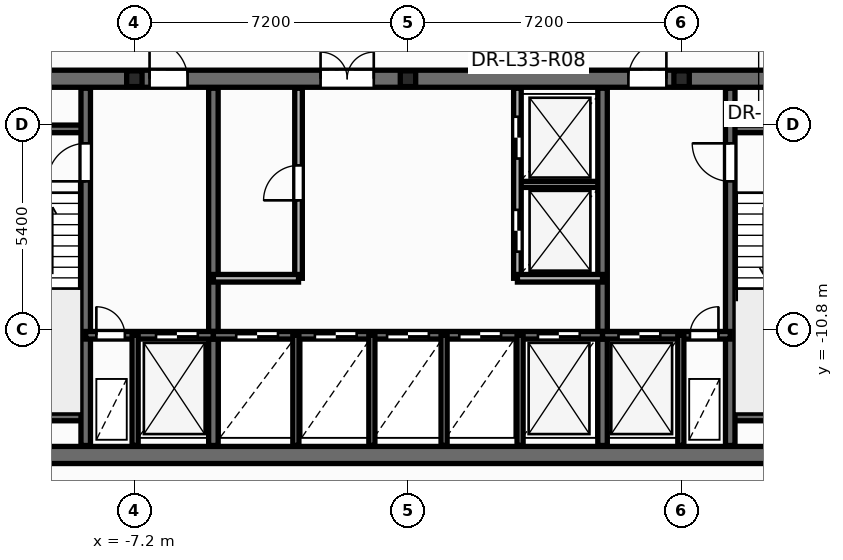
"""IFC4 building model, lengths in metres.
Left out: names, types, materials, properties, quantities, classifications, styles, units other than length and angle.
Written with IfcOpenShell. Run it as: python <this file> out.ifc"""

import sys

from ifc_helpers import new_model, si_unit, direction, frame, frame_2d, origin, origin_2d, place, context, subcontext, project, spatial, rectangle, i_section, extrude, element, fill, save


model = new_model("IFC4")
c1 = context("Model", 3, precision=1e-05, world=origin(), true_north=direction((0.0, 1.0)))
c2 = subcontext(c1, "Body", "Model", "MODEL_VIEW")
j1 = project(units=[si_unit("LENGTHUNIT", "METRE"), si_unit("PLANEANGLEUNIT", "RADIAN")], contexts=[c1])
p1 = place(None, origin())
s1 = spatial("IfcSite", under=j1, at=p1, CompositionType="ELEMENT")
p2 = place(p1, origin())
s2 = spatial("IfcBuilding", under=s1, at=p2, CompositionType="ELEMENT")
p3 = place(p2, frame((0.0, 0.0, 129.3)))
s3 = spatial("IfcBuildingStorey", under=s2, at=p3, CompositionType="ELEMENT", Elevation=129.3)
for number, where, z_axis, x_axis in (
    (1, (-7.2, -4.2, 0.0), (0.0, 0.0, 1.0), (1.0, 0.0, 0.0)),
    (2, (0.0, -4.2, 0.0), (0.0, 0.0, 1.0), (1.0, 0.0, 0.0)),
    (3, (7.2, -4.2, 0.0), (0.0, 0.0, 1.0), (1.0, 0.0, 0.0)),
):
    element("IfcColumn", number, at=place(p3, frame(where, z_axis=z_axis, x_axis=x_axis)), inside=s3, PredefinedType="PILASTER", context=c2, shape_type="SweptSolid", body=[
        extrude(i_section(OverallWidth=0.405, OverallDepth=0.414, WebThickness=0.022, FlangeThickness=0.032, at=origin_2d()), origin(), (0.0, 0.0, 1.0), 3.6),
    ])
p4 = place(p3, frame((2.88, -6.98, 0.0), z_axis=(0.0, 0.0, 1.0), x_axis=(1.0, 0.0, 0.0)))
e4 = element("IfcWall", 4, at=p4, inside=s3, PredefinedType="PARTITIONING", context=c2, shape_type="SweptSolid", body=[
    extrude(rectangle(XDim=2.24, YDim=0.16, at=frame_2d((1.12, 0.0))), origin(), (0.0, 0.0, 1.0), 3.35),
])
p5 = place(p3, frame((-12.65, -14.1, 0.0), z_axis=(0.0, 0.0, 1.0), x_axis=(1.0, 0.0, 0.0)))
e5 = element("IfcWall", 5, at=p5, inside=s3, PredefinedType="SHEAR", context=c2, shape_type="SweptSolid", body=[
    extrude(rectangle(XDim=25.3, YDim=0.45, at=frame_2d((12.65, 0.0))), origin(), (0.0, 0.0, 1.0), 3.6),
])
p6 = place(p3, frame((-12.65, -4.2, 0.0), z_axis=(0.0, 0.0, 1.0), x_axis=(1.0, 0.0, 0.0)))
e6 = element("IfcWall", 6, at=p6, inside=s3, PredefinedType="SHEAR", context=c2, shape_type="SweptSolid", body=[
    extrude(rectangle(XDim=25.3, YDim=0.45, at=frame_2d((12.65, 0.0))), origin(), (0.0, 0.0, 1.0), 3.6),
])
p7 = place(p6, frame((1.85, 0.0, 0.0)))
e7 = element("IfcOpeningElement", 7, at=p7, cuts=e6, PredefinedType="OPENING", context=c2, shape_type="SweptSolid", body=[
    extrude(rectangle(XDim=0.756, YDim=2.054, at=frame_2d((0.375, 1.027))), frame((0.0, 0.235, 0.0), z_axis=(0.0, -1.0, 0.0), x_axis=(1.0, 0.0, 0.0)), (0.0, 0.0, 1.0), 0.47),
])
p8 = place(p6, frame((22.65, 0.0, 0.0)))
e8 = element("IfcOpeningElement", 8, at=p8, cuts=e6, PredefinedType="OPENING", context=c2, shape_type="SweptSolid", body=[
    extrude(rectangle(XDim=0.756, YDim=2.054, at=frame_2d((0.375, 1.027))), frame((0.0, 0.235, 0.0), z_axis=(0.0, -1.0, 0.0), x_axis=(1.0, 0.0, 0.0)), (0.0, 0.0, 1.0), 0.47),
])
p9 = place(p6, frame((5.85, 0.0, 0.0)))
e9 = element("IfcOpeningElement", 9, at=p9, cuts=e6, PredefinedType="OPENING", context=c2, shape_type="SweptSolid", body=[
    extrude(rectangle(XDim=1.006, YDim=2.104, at=frame_2d((0.5, 1.052))), frame((0.0, 0.235, 0.0), z_axis=(0.0, -1.0, 0.0), x_axis=(1.0, 0.0, 0.0)), (0.0, 0.0, 1.0), 0.47),
])
p10 = place(p6, frame((10.35, 0.0, 0.0)))
e10 = element("IfcOpeningElement", 10, at=p10, cuts=e6, PredefinedType="OPENING", context=c2, shape_type="SweptSolid", body=[
    extrude(rectangle(XDim=1.406, YDim=2.154, at=frame_2d((0.7, 1.077))), frame((0.0, 0.235, 0.0), z_axis=(0.0, -1.0, 0.0), x_axis=(1.0, 0.0, 0.0)), (0.0, 0.0, 1.0), 0.47),
])
p11 = place(p6, frame((18.45, 0.0, 0.0)))
e11 = element("IfcOpeningElement", 11, at=p11, cuts=e6, PredefinedType="OPENING", context=c2, shape_type="SweptSolid", body=[
    extrude(rectangle(XDim=1.006, YDim=2.104, at=frame_2d((0.5, 1.052))), frame((0.0, 0.235, 0.0), z_axis=(0.0, -1.0, 0.0), x_axis=(1.0, 0.0, 0.0)), (0.0, 0.0, 1.0), 0.47),
])
for number, where, z_axis, x_axis in (
    (12, (-12.35, -5.52, 0.0), (0.0, 0.0, 1.0), (1.0, 0.0, 0.0)),
    (13, (-12.35, -13.1, 0.0), (0.0, 0.0, 1.0), (1.0, 0.0, 0.0)),
    (14, (8.48, -5.52, 0.0), (0.0, 0.0, 1.0), (1.0, 0.0, 0.0)),
    (15, (8.48, -13.1, 0.0), (0.0, 0.0, 1.0), (1.0, 0.0, 0.0)),
):
    element("IfcWall", number, at=place(p3, frame(where, z_axis=z_axis, x_axis=x_axis)), inside=s3, PredefinedType="SOLIDWALL", context=c2, shape_type="SweptSolid", body=[
        extrude(rectangle(XDim=3.87, YDim=0.2, at=frame_2d((1.935, 0.0))), origin(), (0.0, 0.0, 1.0), 3.6),
    ])
p12 = place(p3, frame((-8.48, -13.85, 0.0), z_axis=(0.0, 0.0, 1.0), x_axis=(0.0, 1.0, 0.0)))
e16 = element("IfcWall", 16, at=p12, inside=s3, PredefinedType="SHEAR", context=c2, shape_type="SweptSolid", body=[
    extrude(rectangle(XDim=9.4, YDim=0.25, at=frame_2d((4.7, 0.0))), origin(), (0.0, 0.0, 1.0), 3.6),
])
p13 = place(p12, frame((6.95, 0.0, 0.0)))
e17 = element("IfcOpeningElement", 17, at=p13, cuts=e16, PredefinedType="OPENING", context=c2, shape_type="SweptSolid", body=[
    extrude(rectangle(XDim=1.006, YDim=2.104, at=frame_2d((0.5, 1.052))), frame((0.0, 0.135, 0.0), z_axis=(0.0, -1.0, 0.0), x_axis=(1.0, 0.0, 0.0)), (0.0, 0.0, 1.0), 0.27),
])
p14 = place(p3, frame((8.48, -13.85, 0.0), z_axis=(0.0, 0.0, 1.0), x_axis=(0.0, 1.0, 0.0)))
e18 = element("IfcWall", 18, at=p14, inside=s3, PredefinedType="SHEAR", context=c2, shape_type="SweptSolid", body=[
    extrude(rectangle(XDim=9.4, YDim=0.25, at=frame_2d((4.7, 0.0))), origin(), (0.0, 0.0, 1.0), 3.6),
])
p15 = place(p14, frame((6.95, 0.0, 0.0)))
e19 = element("IfcOpeningElement", 19, at=p15, cuts=e18, PredefinedType="OPENING", context=c2, shape_type="SweptSolid", body=[
    extrude(rectangle(XDim=1.006, YDim=2.104, at=frame_2d((0.5, 1.052))), frame((0.0, 0.135, 0.0), z_axis=(0.0, -1.0, 0.0), x_axis=(1.0, 0.0, 0.0)), (0.0, 0.0, 1.0), 0.27),
])
for number, where, z_axis, x_axis in (
    (20, (-5.12, -13.85, 0.0), (0.0, 0.0, 1.0), (0.0, 1.0, 0.0)),
    (21, (5.12, -13.85, 0.0), (0.0, 0.0, 1.0), (0.0, 1.0, 0.0)),
):
    element("IfcWall", number, at=place(p3, frame(where, z_axis=z_axis, x_axis=x_axis)), inside=s3, PredefinedType="SHEAR", context=c2, shape_type="SweptSolid", body=[
        extrude(rectangle(XDim=9.4, YDim=0.25, at=frame_2d((4.7, 0.0))), origin(), (0.0, 0.0, 1.0), 3.6),
    ])
p16 = place(p3, frame((-8.48, -10.95, 0.0), z_axis=(0.0, 0.0, 1.0), x_axis=(1.0, 0.0, 0.0)))
e22 = element("IfcWall", 22, at=p16, inside=s3, PredefinedType="SOLIDWALL", context=c2, shape_type="SweptSolid", body=[
    extrude(rectangle(XDim=3.36, YDim=0.2, at=frame_2d((1.68, 0.0))), origin(), (0.0, 0.0, 1.0), 3.6),
])
p17 = place(p16, frame((0.28, 0.0, 0.0)))
e23 = element("IfcOpeningElement", 23, at=p17, cuts=e22, PredefinedType="OPENING", context=c2, shape_type="SweptSolid", body=[
    extrude(rectangle(XDim=0.756, YDim=2.054, at=frame_2d((0.375, 1.027))), frame((0.0, 0.11, 0.0), z_axis=(0.0, -1.0, 0.0), x_axis=(1.0, 0.0, 0.0)), (0.0, 0.0, 1.0), 0.22),
])
p18 = place(p16, frame((1.85, 0.0, 0.0)))
e24 = element("IfcOpeningElement", 24, at=p18, cuts=e22, PredefinedType="OPENING", context=c2, shape_type="SweptSolid", body=[
    extrude(rectangle(XDim=1.106, YDim=2.104, at=frame_2d((0.55, 1.052))), frame((0.0, 0.11, 0.0), z_axis=(0.0, -1.0, 0.0), x_axis=(1.0, 0.0, 0.0)), (0.0, 0.0, 1.0), 0.22),
])
p19 = place(p3, frame((-5.12, -10.95, 0.0), z_axis=(0.0, 0.0, 1.0), x_axis=(1.0, 0.0, 0.0)))
e25 = element("IfcWall", 25, at=p19, inside=s3, PredefinedType="SOLIDWALL", context=c2, shape_type="SweptSolid", body=[
    extrude(rectangle(XDim=10.24, YDim=0.2, at=frame_2d((5.12, 0.0))), origin(), (0.0, 0.0, 1.0), 3.6),
])
p20 = place(p19, frame((0.6, 0.0, 0.0)))
e26 = element("IfcOpeningElement", 26, at=p20, cuts=e25, PredefinedType="OPENING", context=c2, shape_type="SweptSolid", body=[
    extrude(rectangle(XDim=1.106, YDim=2.104, at=frame_2d((0.55, 1.052))), frame((0.0, 0.11, 0.0), z_axis=(0.0, -1.0, 0.0), x_axis=(1.0, 0.0, 0.0)), (0.0, 0.0, 1.0), 0.22),
])
p21 = place(p19, frame((2.67, 0.0, 0.0)))
e27 = element("IfcOpeningElement", 27, at=p21, cuts=e25, PredefinedType="OPENING", context=c2, shape_type="SweptSolid", body=[
    extrude(rectangle(XDim=1.106, YDim=2.104, at=frame_2d((0.55, 1.052))), frame((0.0, 0.11, 0.0), z_axis=(0.0, -1.0, 0.0), x_axis=(1.0, 0.0, 0.0)), (0.0, 0.0, 1.0), 0.22),
])
p22 = place(p19, frame((4.57, 0.0, 0.0)))
e28 = element("IfcOpeningElement", 28, at=p22, cuts=e25, PredefinedType="OPENING", context=c2, shape_type="SweptSolid", body=[
    extrude(rectangle(XDim=1.106, YDim=2.104, at=frame_2d((0.55, 1.052))), frame((0.0, 0.11, 0.0), z_axis=(0.0, -1.0, 0.0), x_axis=(1.0, 0.0, 0.0)), (0.0, 0.0, 1.0), 0.22),
])
p23 = place(p19, frame((6.47, 0.0, 0.0)))
e29 = element("IfcOpeningElement", 29, at=p23, cuts=e25, PredefinedType="OPENING", context=c2, shape_type="SweptSolid", body=[
    extrude(rectangle(XDim=1.106, YDim=2.104, at=frame_2d((0.55, 1.052))), frame((0.0, 0.11, 0.0), z_axis=(0.0, -1.0, 0.0), x_axis=(1.0, 0.0, 0.0)), (0.0, 0.0, 1.0), 0.22),
])
p24 = place(p19, frame((8.54, 0.0, 0.0)))
e30 = element("IfcOpeningElement", 30, at=p24, cuts=e25, PredefinedType="OPENING", context=c2, shape_type="SweptSolid", body=[
    extrude(rectangle(XDim=1.106, YDim=2.104, at=frame_2d((0.55, 1.052))), frame((0.0, 0.11, 0.0), z_axis=(0.0, -1.0, 0.0), x_axis=(1.0, 0.0, 0.0)), (0.0, 0.0, 1.0), 0.22),
])
p25 = place(p3, frame((5.12, -10.95, 0.0), z_axis=(0.0, 0.0, 1.0), x_axis=(1.0, 0.0, 0.0)))
e31 = element("IfcWall", 31, at=p25, inside=s3, PredefinedType="SOLIDWALL", context=c2, shape_type="SweptSolid", body=[
    extrude(rectangle(XDim=3.36, YDim=0.2, at=frame_2d((1.68, 0.0))), origin(), (0.0, 0.0, 1.0), 3.6),
])
p26 = place(p25, frame((0.42, 0.0, 0.0)))
e32 = element("IfcOpeningElement", 32, at=p26, cuts=e31, PredefinedType="OPENING", context=c2, shape_type="SweptSolid", body=[
    extrude(rectangle(XDim=1.106, YDim=2.104, at=frame_2d((0.55, 1.052))), frame((0.0, 0.11, 0.0), z_axis=(0.0, -1.0, 0.0), x_axis=(1.0, 0.0, 0.0)), (0.0, 0.0, 1.0), 0.22),
])
p27 = place(p25, frame((2.3, 0.0, 0.0)))
e33 = element("IfcOpeningElement", 33, at=p27, cuts=e31, PredefinedType="OPENING", context=c2, shape_type="SweptSolid", body=[
    extrude(rectangle(XDim=0.756, YDim=2.054, at=frame_2d((0.375, 1.027))), frame((0.0, 0.11, 0.0), z_axis=(0.0, -1.0, 0.0), x_axis=(1.0, 0.0, 0.0)), (0.0, 0.0, 1.0), 0.22),
])
for number, where, z_axis, x_axis in (
    (34, (-7.18, -13.85, 0.0), (0.0, 0.0, 1.0), (0.0, 1.0, 0.0)),
    (35, (7.18, -13.85, 0.0), (0.0, 0.0, 1.0), (0.0, 1.0, 0.0)),
    (36, (-2.95, -13.85, 0.0), (0.0, 0.0, 1.0), (0.0, 1.0, 0.0)),
    (37, (2.95, -13.85, 0.0), (0.0, 0.0, 1.0), (0.0, 1.0, 0.0)),
):
    element("IfcWall", number, at=place(p3, frame(where, z_axis=z_axis, x_axis=x_axis)), inside=s3, PredefinedType="PARTITIONING", context=c2, shape_type="SweptSolid", body=[
        extrude(rectangle(XDim=2.9, YDim=0.16, at=frame_2d((1.45, 0.0))), origin(), (0.0, 0.0, 1.0), 2.475),
    ])
p28 = place(p3, frame((-2.88, -9.45, 0.0), z_axis=(0.0, 0.0, 1.0), x_axis=(0.0, 1.0, 0.0)))
e38 = element("IfcWall", 38, at=p28, inside=s3, PredefinedType="SOLIDWALL", context=c2, shape_type="SweptSolid", body=[
    extrude(rectangle(XDim=5.0, YDim=0.2, at=frame_2d((2.5, 0.0))), origin(), (0.0, 0.0, 1.0), 3.35),
])
p29 = place(p28, frame((2.05, 0.0, 0.0)))
e39 = element("IfcOpeningElement", 39, at=p29, cuts=e38, PredefinedType="OPENING", context=c2, shape_type="SweptSolid", body=[
    extrude(rectangle(XDim=0.926, YDim=2.104, at=frame_2d((0.46, 1.052))), frame((0.0, 0.11, 0.0), z_axis=(0.0, -1.0, 0.0), x_axis=(1.0, 0.0, 0.0)), (0.0, 0.0, 1.0), 0.22),
])
p30 = place(p3, frame((-5.12, -9.45, 0.0), z_axis=(0.0, 0.0, 1.0), x_axis=(1.0, 0.0, 0.0)))
e40 = element("IfcWall", 40, at=p30, inside=s3, PredefinedType="SOLIDWALL", context=c2, shape_type="SweptSolid", body=[
    extrude(rectangle(XDim=2.24, YDim=0.2, at=frame_2d((1.12, 0.0))), origin(), (0.0, 0.0, 1.0), 3.35),
])
p31 = place(p3, frame((2.88, -9.45, 0.0), z_axis=(0.0, 0.0, 1.0), x_axis=(0.0, 1.0, 0.0)))
e41 = element("IfcWall", 41, at=p31, inside=s3, PredefinedType="SOLIDWALL", context=c2, shape_type="SweptSolid", body=[
    extrude(rectangle(XDim=5.0, YDim=0.2, at=frame_2d((2.5, 0.0))), origin(), (0.0, 0.0, 1.0), 3.35),
])
p32 = place(p31, frame((0.7, 0.0, 0.0)))
e42 = element("IfcOpeningElement", 42, at=p32, cuts=e41, PredefinedType="OPENING", context=c2, shape_type="SweptSolid", body=[
    extrude(rectangle(XDim=1.106, YDim=2.104, at=frame_2d((0.55, 1.052))), frame((0.0, 0.11, 0.0), z_axis=(0.0, -1.0, 0.0), x_axis=(1.0, 0.0, 0.0)), (0.0, 0.0, 1.0), 0.22),
])
p33 = place(p31, frame((3.15, 0.0, 0.0)))
e43 = element("IfcOpeningElement", 43, at=p33, cuts=e41, PredefinedType="OPENING", context=c2, shape_type="SweptSolid", body=[
    extrude(rectangle(XDim=1.106, YDim=2.104, at=frame_2d((0.55, 1.052))), frame((0.0, 0.11, 0.0), z_axis=(0.0, -1.0, 0.0), x_axis=(1.0, 0.0, 0.0)), (0.0, 0.0, 1.0), 0.22),
])
p34 = place(p3, frame((2.88, -9.45, 0.0), z_axis=(0.0, 0.0, 1.0), x_axis=(1.0, 0.0, 0.0)))
e44 = element("IfcWall", 44, at=p34, inside=s3, PredefinedType="SOLIDWALL", context=c2, shape_type="SweptSolid", body=[
    extrude(rectangle(XDim=2.24, YDim=0.2, at=frame_2d((1.12, 0.0))), origin(), (0.0, 0.0, 1.0), 3.35),
])
for number, where, z_axis, x_axis in (
    (45, (-0.95, -13.85, 0.0), (0.0, 0.0, 1.0), (0.0, 1.0, 0.0)),
    (46, (0.95, -13.85, 0.0), (0.0, 0.0, 1.0), (0.0, 1.0, 0.0)),
):
    element("IfcWall", number, at=place(p3, frame(where, z_axis=z_axis, x_axis=x_axis)), inside=s3, PredefinedType="PARTITIONING", context=c2, shape_type="SweptSolid", body=[
        extrude(rectangle(XDim=2.9, YDim=0.16, at=frame_2d((1.45, 0.0))), origin(), (0.0, 0.0, 1.0), 2.475),
    ])
p35 = place(p29, origin())
e47 = element("IfcDoor", 47, at=p35, inside=s3, OperationType="SINGLE_SWING_LEFT", PredefinedType="DOOR", context=c2, shape_type="SweptSolid", body=[
    extrude(rectangle(XDim=0.92, YDim=2.1, at=frame_2d((0.46, 1.05))), frame((0.0, 0.025, 0.0), z_axis=(0.0, -1.0, 0.0), x_axis=(1.0, 0.0, 0.0)), (0.0, 0.0, 1.0), 0.05),
])
fill(e39, e47)
p36 = place(p32, origin())
e48 = element("IfcDoor", 48, at=p36, inside=s3, OperationType="DOUBLE_DOOR_SLIDING", PredefinedType="DOOR", context=c2, shape_type="SweptSolid", body=[
    extrude(rectangle(XDim=1.1, YDim=2.1, at=frame_2d((0.55, 1.05))), frame((0.0, 0.025, 0.0), z_axis=(0.0, -1.0, 0.0), x_axis=(1.0, 0.0, 0.0)), (0.0, 0.0, 1.0), 0.05),
])
fill(e42, e48)
p37 = place(p33, origin())
e49 = element("IfcDoor", 49, at=p37, inside=s3, OperationType="DOUBLE_DOOR_SLIDING", PredefinedType="DOOR", context=c2, shape_type="SweptSolid", body=[
    extrude(rectangle(XDim=1.1, YDim=2.1, at=frame_2d((0.55, 1.05))), frame((0.0, 0.025, 0.0), z_axis=(0.0, -1.0, 0.0), x_axis=(1.0, 0.0, 0.0)), (0.0, 0.0, 1.0), 0.05),
])
fill(e43, e49)
p38 = place(p13, origin())
e50 = element("IfcDoor", 50, at=p38, inside=s3, OperationType="SINGLE_SWING_LEFT", PredefinedType="DOOR", context=c2, shape_type="SweptSolid", body=[
    extrude(rectangle(XDim=1.0, YDim=2.1, at=frame_2d((0.5, 1.05))), frame((0.0, 0.025, 0.0), z_axis=(0.0, -1.0, 0.0), x_axis=(1.0, 0.0, 0.0)), (0.0, 0.0, 1.0), 0.05),
])
fill(e17, e50)
p39 = place(p15, origin())
e51 = element("IfcDoor", 51, at=p39, inside=s3, OperationType="SINGLE_SWING_RIGHT", PredefinedType="DOOR", context=c2, shape_type="SweptSolid", body=[
    extrude(rectangle(XDim=1.0, YDim=2.1, at=frame_2d((0.5, 1.05))), frame((0.0, 0.025, 0.0), z_axis=(0.0, -1.0, 0.0), x_axis=(1.0, 0.0, 0.0)), (0.0, 0.0, 1.0), 0.05),
])
fill(e19, e51)
p40 = place(p17, origin())
e52 = element("IfcDoor", 52, at=p40, inside=s3, OperationType="SINGLE_SWING_LEFT", PredefinedType="DOOR", context=c2, shape_type="SweptSolid", body=[
    extrude(rectangle(XDim=0.75, YDim=2.05, at=frame_2d((0.375, 1.025))), frame((0.0, 0.025, 0.0), z_axis=(0.0, -1.0, 0.0), x_axis=(1.0, 0.0, 0.0)), (0.0, 0.0, 1.0), 0.05),
])
fill(e23, e52)
p41 = place(p18, origin())
e53 = element("IfcDoor", 53, at=p41, inside=s3, OperationType="DOUBLE_DOOR_SLIDING", PredefinedType="DOOR", context=c2, shape_type="SweptSolid", body=[
    extrude(rectangle(XDim=1.1, YDim=2.1, at=frame_2d((0.55, 1.05))), frame((0.0, 0.025, 0.0), z_axis=(0.0, -1.0, 0.0), x_axis=(1.0, 0.0, 0.0)), (0.0, 0.0, 1.0), 0.05),
])
fill(e24, e53)
p42 = place(p26, origin())
e54 = element("IfcDoor", 54, at=p42, inside=s3, OperationType="DOUBLE_DOOR_SLIDING", PredefinedType="DOOR", context=c2, shape_type="SweptSolid", body=[
    extrude(rectangle(XDim=1.1, YDim=2.1, at=frame_2d((0.55, 1.05))), frame((0.0, 0.025, 0.0), z_axis=(0.0, -1.0, 0.0), x_axis=(1.0, 0.0, 0.0)), (0.0, 0.0, 1.0), 0.05),
])
fill(e32, e54)
p43 = place(p27, origin())
e55 = element("IfcDoor", 55, at=p43, inside=s3, OperationType="SINGLE_SWING_RIGHT", PredefinedType="DOOR", context=c2, shape_type="SweptSolid", body=[
    extrude(rectangle(XDim=0.75, YDim=2.05, at=frame_2d((0.375, 1.025))), frame((0.0, 0.025, 0.0), z_axis=(0.0, -1.0, 0.0), x_axis=(1.0, 0.0, 0.0)), (0.0, 0.0, 1.0), 0.05),
])
fill(e33, e55)
p44 = place(p20, origin())
e56 = element("IfcDoor", 56, at=p44, inside=s3, OperationType="DOUBLE_DOOR_SLIDING", PredefinedType="DOOR", context=c2, shape_type="SweptSolid", body=[
    extrude(rectangle(XDim=1.1, YDim=2.1, at=frame_2d((0.55, 1.05))), frame((0.0, 0.025, 0.0), z_axis=(0.0, -1.0, 0.0), x_axis=(1.0, 0.0, 0.0)), (0.0, 0.0, 1.0), 0.05),
])
fill(e26, e56)
p45 = place(p21, origin())
e57 = element("IfcDoor", 57, at=p45, inside=s3, OperationType="DOUBLE_DOOR_SLIDING", PredefinedType="DOOR", context=c2, shape_type="SweptSolid", body=[
    extrude(rectangle(XDim=1.1, YDim=2.1, at=frame_2d((0.55, 1.05))), frame((0.0, 0.025, 0.0), z_axis=(0.0, -1.0, 0.0), x_axis=(1.0, 0.0, 0.0)), (0.0, 0.0, 1.0), 0.05),
])
fill(e27, e57)
p46 = place(p22, origin())
e58 = element("IfcDoor", 58, at=p46, inside=s3, OperationType="DOUBLE_DOOR_SLIDING", PredefinedType="DOOR", context=c2, shape_type="SweptSolid", body=[
    extrude(rectangle(XDim=1.1, YDim=2.1, at=frame_2d((0.55, 1.05))), frame((0.0, 0.025, 0.0), z_axis=(0.0, -1.0, 0.0), x_axis=(1.0, 0.0, 0.0)), (0.0, 0.0, 1.0), 0.05),
])
fill(e28, e58)
p47 = place(p23, origin())
e59 = element("IfcDoor", 59, at=p47, inside=s3, OperationType="DOUBLE_DOOR_SLIDING", PredefinedType="DOOR", context=c2, shape_type="SweptSolid", body=[
    extrude(rectangle(XDim=1.1, YDim=2.1, at=frame_2d((0.55, 1.05))), frame((0.0, 0.025, 0.0), z_axis=(0.0, -1.0, 0.0), x_axis=(1.0, 0.0, 0.0)), (0.0, 0.0, 1.0), 0.05),
])
fill(e29, e59)
p48 = place(p24, origin())
e60 = element("IfcDoor", 60, at=p48, inside=s3, OperationType="DOUBLE_DOOR_SLIDING", PredefinedType="DOOR", context=c2, shape_type="SweptSolid", body=[
    extrude(rectangle(XDim=1.1, YDim=2.1, at=frame_2d((0.55, 1.05))), frame((0.0, 0.025, 0.0), z_axis=(0.0, -1.0, 0.0), x_axis=(1.0, 0.0, 0.0)), (0.0, 0.0, 1.0), 0.05),
])
fill(e30, e60)
p49 = place(p9, origin())
e61 = element("IfcDoor", 61, at=p49, inside=s3, OperationType="SINGLE_SWING_LEFT", PredefinedType="DOOR", context=c2, shape_type="SweptSolid", body=[
    extrude(rectangle(XDim=1.0, YDim=2.1, at=frame_2d((0.5, 1.05))), frame((0.0, 0.025, 0.0), z_axis=(0.0, -1.0, 0.0), x_axis=(1.0, 0.0, 0.0)), (0.0, 0.0, 1.0), 0.05),
])
fill(e9, e61)
p50 = place(p10, origin())
e62 = element("IfcDoor", 62, at=p50, inside=s3, OperationType="DOUBLE_DOOR_SINGLE_SWING", PredefinedType="DOOR", context=c2, shape_type="SweptSolid", body=[
    extrude(rectangle(XDim=1.4, YDim=2.15, at=frame_2d((0.7, 1.075))), frame((0.0, 0.025, 0.0), z_axis=(0.0, -1.0, 0.0), x_axis=(1.0, 0.0, 0.0)), (0.0, 0.0, 1.0), 0.05),
])
fill(e10, e62)
p51 = place(p11, origin())
e63 = element("IfcDoor", 63, at=p51, inside=s3, OperationType="SINGLE_SWING_RIGHT", PredefinedType="DOOR", context=c2, shape_type="SweptSolid", body=[
    extrude(rectangle(XDim=1.0, YDim=2.1, at=frame_2d((0.5, 1.05))), frame((0.0, 0.025, 0.0), z_axis=(0.0, -1.0, 0.0), x_axis=(1.0, 0.0, 0.0)), (0.0, 0.0, 1.0), 0.05),
])
fill(e11, e63)
save(model, sys.argv[1])
